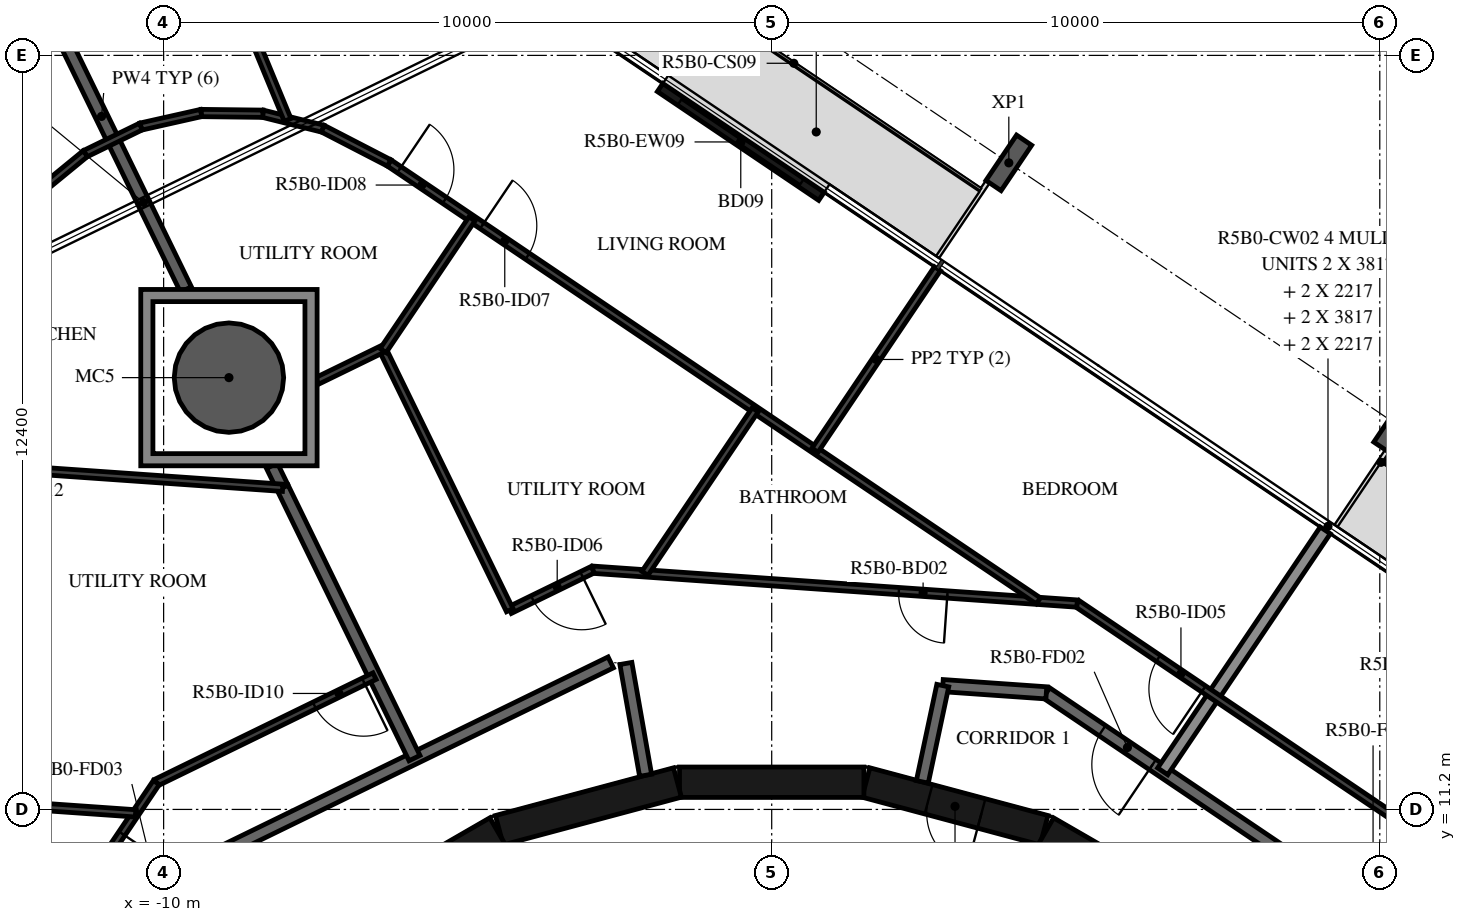
"""IFC4 building model, lengths in metres.
Left out: names, types, materials, properties, quantities, classifications, styles, units other than length and angle.
Written with IfcOpenShell. Run it as: python <this file> out.ifc"""

import sys

from ifc_helpers import new_model, si_unit, direction, frame, frame_2d, origin, origin_2d, place, context, subcontext, project, spatial, polyline, rectangle, hollow_circle, i_section, outline, extrude, element, fill, save


model = new_model("IFC4")
c1 = context("Model", 3, precision=1e-05, world=origin(), true_north=direction((0.0, 1.0)))
c2 = subcontext(c1, "Body", "Model", "MODEL_VIEW")
j1 = project(units=[si_unit("LENGTHUNIT", "METRE"), si_unit("PLANEANGLEUNIT", "RADIAN")], contexts=[c1])
p1 = place(None, origin())
s1 = spatial("IfcSite", under=j1, at=p1, CompositionType="ELEMENT")
p2 = place(p1, origin())
s2 = spatial("IfcBuilding", under=s1, at=p2, CompositionType="ELEMENT")
p3 = place(p2, frame((0.0, 0.0, 202.4)))
s3 = spatial("IfcBuildingStorey", under=s2, at=p3, CompositionType="ELEMENT", Elevation=202.4)
p4 = place(p3, frame((-8.926, 18.301, -0.38), z_axis=(0.0, 0.0, 1.0), x_axis=(1.0, 0.0, 0.0)))
e1 = element("IfcColumn", 1, at=p4, inside=s3, PredefinedType="COLUMN", context=c2, shape_type="SweptSolid", body=[
    extrude(hollow_circle(Radius=0.9, WallThickness=0.04, at=origin_2d()), origin(), (0.0, 0.0, 1.0), 3.5),
])
for number, where, z_axis, x_axis in (
    (2, (10.278, 17.531, -0.38), (0.0, 0.0, 1.0), (0.829, -0.559, 0.0)),
    (3, (3.899, 21.833, -0.38), (0.0, 0.0, 1.0), (0.829, -0.559, 0.0)),
):
    element("IfcColumn", number, at=place(p3, frame(where, z_axis=z_axis, x_axis=x_axis)), inside=s3, PredefinedType="COLUMN", context=c2, shape_type="SweptSolid", body=[
        extrude(i_section(OverallWidth=0.3, OverallDepth=0.9, WebThickness=0.019, FlangeThickness=0.035, FilletRadius=0.03, at=origin_2d()), origin(), (0.0, 0.0, 1.0), 3.5),
    ])
p5 = place(p3, frame((0.818, 21.282, 0.0), z_axis=(0.0, 0.0, 1.0), x_axis=(-0.829044984211, 0.559181915082, 0.0)))
e4 = element("IfcWall", 4, at=p5, inside=s3, PredefinedType="STANDARD", context=c2, shape_type="SweptSolid", body=[
    extrude(rectangle(XDim=3.2, YDim=0.16, at=frame_2d((1.6, 0.0))), origin(), (0.0, 0.0, 1.0), 3.12),
])
p6 = place(p5, frame((0.4, 0.0, 0.0)))
e5 = element("IfcOpeningElement", 5, at=p6, cuts=e4, PredefinedType="OPENING", context=c2, shape_type="SweptSolid", body=[
    extrude(rectangle(XDim=2.4, YDim=2.4, at=frame_2d((1.2, 1.2))), frame((0.0, 0.09, 0.0), z_axis=(0.0, -1.0, 0.0), x_axis=(1.0, 0.0, 0.0)), (0.0, 0.0, 1.0), 0.18),
])
p7 = place(p3, frame((7.137, 9.329, 0.0), z_axis=(0.0, 0.0, 1.0), x_axis=(-0.865975092491, 0.500087131594, 0.0)))
e6 = element("IfcWall", 6, at=p7, inside=s3, PredefinedType="SHEAR", context=c2, shape_type="SweptSolid", body=[
    extrude(rectangle(XDim=3.033, YDim=0.5, at=frame_2d((1.516, 0.0))), origin(), (0.0, 0.0, 1.0), 3.12),
])
p8 = place(p3, frame((4.479, 10.858, 0.0), z_axis=(0.0, 0.0, 1.0), x_axis=(-0.965948410781, 0.258734743916, 0.0)))
e7 = element("IfcWall", 7, at=p8, inside=s3, PredefinedType="SHEAR", context=c2, shape_type="SweptSolid", body=[
    extrude(rectangle(XDim=3.033, YDim=0.5, at=frame_2d((1.516, 0.0))), origin(), (0.0, 0.0, 1.0), 3.12),
])
p9 = place(p8, frame((1.066, 0.0, 0.0)))
e8 = element("IfcOpeningElement", 8, at=p9, cuts=e7, PredefinedType="OPENING", context=c2, shape_type="SweptSolid", body=[
    extrude(rectangle(XDim=0.9, YDim=2.1, at=frame_2d((0.45, 1.05))), frame((0.0, 0.26, 0.0), z_axis=(0.0, -1.0, 0.0), x_axis=(1.0, 0.0, 0.0)), (0.0, 0.0, 1.0), 0.52),
])
for number, where, z_axis, x_axis in (
    (9, (1.516, 11.647, 0.0), (0.0, 0.0, 1.0), (-1.0, 0.0, 0.0)),
    (10, (-1.55, 11.643, 0.0), (0.0, 0.0, 1.0), (-0.966, -0.259, 0.0)),
    (11, (-4.51, 10.845, 0.0), (0.0, 0.0, 1.0), (-0.866, -0.5, 0.0)),
):
    element("IfcWall", number, at=place(p3, frame(where, z_axis=z_axis, x_axis=x_axis)), inside=s3, PredefinedType="SHEAR", context=c2, shape_type="SweptSolid", body=[
        extrude(rectangle(XDim=3.033, YDim=0.5, at=frame_2d((1.516, 0.0))), origin(), (0.0, 0.0, 1.0), 3.12),
    ])
p10 = place(p3, frame((10.47, 9.101, 0.0), z_axis=(0.0, 0.0, 1.0), x_axis=(-0.829035841718, 0.559195469534, 0.0)))
e12 = element("IfcWall", 12, at=p10, inside=s3, PredefinedType="STANDARD", context=c2, shape_type="SweptSolid", body=[
    extrude(rectangle(XDim=7.181, YDim=0.2, at=frame_2d((3.591, 0.0))), origin(), (0.0, 0.0, 1.0), 3.12),
])
p11 = place(p10, frame((0.2, 0.0, 0.0)))
e13 = element("IfcOpeningElement", 13, at=p11, cuts=e12, PredefinedType="OPENING", context=c2, shape_type="SweptSolid", body=[
    extrude(rectangle(XDim=1.0, YDim=2.1, at=frame_2d((0.5, 1.05))), frame((0.0, 0.11, 0.0), z_axis=(0.0, -1.0, 0.0), x_axis=(1.0, 0.0, 0.0)), (0.0, 0.0, 1.0), 0.22),
])
p12 = place(p10, frame((5.073, 0.0, 0.0)))
e14 = element("IfcOpeningElement", 14, at=p12, cuts=e12, PredefinedType="OPENING", context=c2, shape_type="SweptSolid", body=[
    extrude(rectangle(XDim=1.0, YDim=2.1, at=frame_2d((0.5, 1.05))), frame((0.0, 0.11, 0.0), z_axis=(0.0, -1.0, 0.0), x_axis=(1.0, 0.0, 0.0)), (0.0, 0.0, 1.0), 0.22),
])
p13 = place(p3, frame((4.517, 13.117, 0.0), z_axis=(0.0, 0.0, 1.0), x_axis=(-0.997562153664, 0.069783591025, 0.0)))
e15 = element("IfcWall", 15, at=p13, inside=s3, PredefinedType="STANDARD", context=c2, shape_type="SweptSolid", body=[
    extrude(rectangle(XDim=1.707, YDim=0.2, at=frame_2d((0.854, 0.0))), origin(), (0.0, 0.0, 1.0), 3.12),
])
p14 = place(p3, frame((2.813, 13.236, 0.0), z_axis=(0.0, 0.0, 1.0), x_axis=(-0.207911086063, -0.978147729278, 0.0)))
e16 = element("IfcWall", 16, at=p14, inside=s3, PredefinedType="STANDARD", context=c2, shape_type="SweptSolid", body=[
    extrude(rectangle(XDim=1.618, YDim=0.2, at=frame_2d((0.809, 0.0))), origin(), (0.0, 0.0, 1.0), 3.12),
])
p15 = place(p3, frame((-2.074, 11.761, 0.0), z_axis=(0.0, 0.0, 1.0), x_axis=(-0.173740587112, 0.984791454263, 0.0)))
e17 = element("IfcWall", 17, at=p15, inside=s3, PredefinedType="STANDARD", context=c2, shape_type="SweptSolid", body=[
    extrude(rectangle(XDim=1.867, YDim=0.2, at=frame_2d((0.934, 0.0))), origin(), (0.0, 0.0, 1.0), 3.12),
])
p16 = place(p3, frame((-2.647, 13.618, 0.0), z_axis=(0.0, 0.0, 1.0), x_axis=(-0.898796543751, -0.438366026218, 0.0)))
e18 = element("IfcWall", 18, at=p16, inside=s3, PredefinedType="STANDARD", context=c2, shape_type="SweptSolid", body=[
    extrude(rectangle(XDim=7.181, YDim=0.2, at=frame_2d((3.591, 0.0))), origin(), (0.0, 0.0, 1.0), 3.12),
])
p17 = place(p3, frame((9.104, 15.79, 0.0), z_axis=(0.0, 0.0, 1.0), x_axis=(-0.559193912135, -0.829036892201, 0.0)))
e19 = element("IfcWall", 19, at=p17, inside=s3, PredefinedType="STANDARD", context=c2, shape_type="SweptSolid", body=[
    extrude(rectangle(XDim=4.781, YDim=0.2, at=frame_2d((2.39, 0.0))), origin(), (0.0, 0.0, 1.0), 2.73),
])
p18 = place(p3, frame((-8.042, 16.489, 0.0), z_axis=(0.0, 0.0, 1.0), x_axis=(0.438345825707, -0.898806395774, 0.0)))
e20 = element("IfcWall", 20, at=p18, inside=s3, PredefinedType="STANDARD", context=c2, shape_type="SweptSolid", body=[
    extrude(rectangle(XDim=4.946, YDim=0.2, at=frame_2d((2.473, 0.0))), origin(), (0.0, 0.0, 1.0), 3.12),
])
p19 = place(p3, frame((-8.219, 16.851, 0.0), z_axis=(0.0, 0.0, 1.0), x_axis=(0.438281645094, -0.898837693676, 0.0)))
e21 = element("IfcWall", 21, at=p19, inside=s3, PredefinedType="STANDARD", context=c2, shape_type="SweptSolid", body=[
    extrude(rectangle(XDim=0.373, YDim=0.2, at=frame_2d((0.186, 0.0))), origin(), (0.0, 0.0, 1.0), 3.12),
])
p20 = place(p3, frame((-12.409, 25.442, 0.0), z_axis=(0.0, 0.0, 1.0), x_axis=(0.43838641251, -0.898786600549, 0.0)))
e22 = element("IfcWall", 22, at=p20, inside=s3, PredefinedType="STANDARD", context=c2, shape_type="SweptSolid", body=[
    extrude(rectangle(XDim=6.333, YDim=0.2, at=frame_2d((3.166, 0.0))), origin(), (0.0, 0.0, 1.0), 3.12),
])
p21 = place(p3, frame((11.642, 10.12, 0.0), z_axis=(0.0, 0.0, 1.0), x_axis=(-0.829032241779, 0.55920080659, 0.0)))
e23 = element("IfcWall", 23, at=p21, inside=s3, PredefinedType="PARTITIONING", context=c2, shape_type="SweptSolid", body=[
    extrude(rectangle(XDim=7.985, YDim=0.12, at=frame_2d((3.992, 0.0))), origin(), (0.0, 0.0, 1.0), 3.12),
])
p22 = place(p21, frame((0.2, 0.0, 0.0)))
e24 = element("IfcOpeningElement", 24, at=p22, cuts=e23, PredefinedType="OPENING", context=c2, shape_type="SweptSolid", body=[
    extrude(rectangle(XDim=0.9, YDim=2.1, at=frame_2d((0.45, 1.05))), frame((0.0, 0.07, 0.0), z_axis=(0.0, -1.0, 0.0), x_axis=(1.0, 0.0, 0.0)), (0.0, 0.0, 1.0), 0.14),
])
p23 = place(p21, frame((5.475, 0.0, 0.0)))
e25 = element("IfcOpeningElement", 25, at=p23, cuts=e23, PredefinedType="OPENING", context=c2, shape_type="SweptSolid", body=[
    extrude(rectangle(XDim=0.9, YDim=2.1, at=frame_2d((0.45, 1.05))), frame((0.0, 0.07, 0.0), z_axis=(0.0, -1.0, 0.0), x_axis=(1.0, 0.0, 0.0)), (0.0, 0.0, 1.0), 0.14),
])
p24 = place(p3, frame((5.022, 14.585, 0.0), z_axis=(0.0, 0.0, 1.0), x_axis=(-0.997565118395, 0.069741197017, 0.0)))
e26 = element("IfcWall", 26, at=p24, inside=s3, PredefinedType="PARTITIONING", context=c2, shape_type="SweptSolid", body=[
    extrude(rectangle(XDim=7.985, YDim=0.12, at=frame_2d((3.993, 0.0))), origin(), (0.0, 0.0, 1.0), 3.12),
])
p25 = place(p24, frame((2.138, 0.0, 0.0)))
e27 = element("IfcOpeningElement", 27, at=p25, cuts=e26, PredefinedType="OPENING", context=c2, shape_type="SweptSolid", body=[
    extrude(rectangle(XDim=0.8, YDim=2.1, at=frame_2d((0.4, 1.05))), frame((0.0, 0.07, 0.0), z_axis=(0.0, -1.0, 0.0), x_axis=(1.0, 0.0, 0.0)), (0.0, 0.0, 1.0), 0.14),
])
p26 = place(p3, frame((-2.943, 15.142, 0.0), z_axis=(0.0, 0.0, 1.0), x_axis=(-0.898853439798, -0.438249351127, 0.0)))
e28 = element("IfcWall", 28, at=p26, inside=s3, PredefinedType="PARTITIONING", context=c2, shape_type="SweptSolid", body=[
    extrude(rectangle(XDim=1.518, YDim=0.12, at=frame_2d((0.759, 0.0))), origin(), (0.0, 0.0, 1.0), 3.12),
])
p27 = place(p26, frame((0.2, 0.0, 0.0)))
e29 = element("IfcOpeningElement", 29, at=p27, cuts=e28, PredefinedType="OPENING", context=c2, shape_type="SweptSolid", body=[
    extrude(rectangle(XDim=0.9, YDim=2.1, at=frame_2d((0.45, 1.05))), frame((0.0, 0.07, 0.0), z_axis=(0.0, -1.0, 0.0), x_axis=(1.0, 0.0, 0.0)), (0.0, 0.0, 1.0), 0.14),
])
p28 = place(p3, frame((-4.308, 14.477, 0.0), z_axis=(0.0, 0.0, 1.0), x_axis=(-0.43837096777, 0.898794133613, 0.0)))
e30 = element("IfcWall", 30, at=p28, inside=s3, PredefinedType="PARTITIONING", context=c2, shape_type="SweptSolid", body=[
    extrude(rectangle(XDim=4.75, YDim=0.12, at=frame_2d((2.375, 0.0))), origin(), (0.0, 0.0, 1.0), 3.12),
])
p29 = place(p3, frame((-6.402, 18.771, 0.0), z_axis=(0.0, 0.0, 1.0), x_axis=(-0.898797905192, -0.438363234797, 0.0)))
e31 = element("IfcWall", 31, at=p29, inside=s3, PredefinedType="PARTITIONING", context=c2, shape_type="SweptSolid", body=[
    extrude(rectangle(XDim=1.195, YDim=0.12, at=frame_2d((0.597, 0.0))), origin(), (0.0, 0.0, 1.0), 3.12),
])
p30 = place(p3, frame((-6.292, 21.831, 0.0), z_axis=(0.0, 0.0, 1.0), x_axis=(0.829040041754, -0.559189242715, 0.0)))
e32 = element("IfcWall", 32, at=p30, inside=s3, PredefinedType="PARTITIONING", context=c2, shape_type="SweptSolid", body=[
    extrude(rectangle(XDim=12.879, YDim=0.12, at=frame_2d((6.439, 0.0))), origin(), (0.0, 0.0, 1.0), 3.12),
])
p31 = place(p30, frame((1.844, 0.0, 0.0)))
e33 = element("IfcOpeningElement", 33, at=p31, cuts=e32, PredefinedType="OPENING", context=c2, shape_type="SweptSolid", body=[
    extrude(rectangle(XDim=0.9, YDim=2.1, at=frame_2d((0.45, 1.05))), frame((0.0, 0.07, 0.0), z_axis=(0.0, -1.0, 0.0), x_axis=(1.0, 0.0, 0.0)), (0.0, 0.0, 1.0), 0.14),
])
p32 = place(p30, frame((0.2, 0.0, 0.0)))
e34 = element("IfcOpeningElement", 34, at=p32, cuts=e32, PredefinedType="OPENING", context=c2, shape_type="SweptSolid", body=[
    extrude(rectangle(XDim=0.9, YDim=2.1, at=frame_2d((0.45, 1.05))), frame((0.0, 0.07, 0.0), z_axis=(0.0, -1.0, 0.0), x_axis=(1.0, 0.0, 0.0)), (0.0, 0.0, 1.0), 0.14),
])
p33 = place(p3, frame((2.725, 20.092, 0.0), z_axis=(0.0, 0.0, 1.0), x_axis=(-0.559230560117, -0.829012171582, 0.0)))
e35 = element("IfcWall", 35, at=p33, inside=s3, PredefinedType="PARTITIONING", context=c2, shape_type="SweptSolid", body=[
    extrude(rectangle(XDim=3.6, YDim=0.12, at=frame_2d((1.8, 0.0))), origin(), (0.0, 0.0, 1.0), 2.73),
])
p34 = place(p3, frame((-0.272, 17.771, 0.0), z_axis=(0.0, 0.0, 1.0), x_axis=(-0.559174158254, -0.829050216055, 0.0)))
e36 = element("IfcWall", 36, at=p34, inside=s3, PredefinedType="PARTITIONING", context=c2, shape_type="SweptSolid", body=[
    extrude(rectangle(XDim=3.243, YDim=0.12, at=frame_2d((1.622, 0.0))), origin(), (0.0, 0.0, 1.0), 3.12),
])
p35 = place(p3, frame((-8.367, 22.64, 0.0), z_axis=(0.0, 0.0, 1.0), x_axis=(0.970340073087, -0.241743960754, 0.0)))
e37 = element("IfcWall", 37, at=p35, inside=s3, PredefinedType="PARTITIONING", context=c2, shape_type="SweptSolid", body=[
    extrude(rectangle(XDim=1.016, YDim=0.12, at=frame_2d((0.508, 0.0))), origin(), (0.0, 0.0, 1.0), 3.12),
])
p36 = place(p3, frame((-7.382, 22.395, 0.0), z_axis=(0.0, 0.0, 1.0), x_axis=(0.888296031948, -0.459271335514, 0.0)))
e38 = element("IfcWall", 38, at=p36, inside=s3, PredefinedType="PARTITIONING", context=c2, shape_type="SweptSolid", body=[
    extrude(rectangle(XDim=1.227, YDim=0.12, at=frame_2d((0.613, 0.0))), origin(), (0.0, 0.0, 1.0), 3.12),
])
p37 = place(p3, frame((-9.498, 26.254, 0.0), z_axis=(0.0, 0.0, 1.0), x_axis=(0.38230709116, -0.924035328355, 0.0)))
e39 = element("IfcWall", 39, at=p37, inside=s3, PredefinedType="PARTITIONING", context=c2, shape_type="SweptSolid", body=[
    extrude(rectangle(XDim=4.02, YDim=0.12, at=frame_2d((2.01, 0.0))), origin(), (0.0, 0.0, 1.0), 3.12),
])
p38 = place(p37, frame((0.3, 0.0, 0.0)))
e40 = element("IfcOpeningElement", 40, at=p38, cuts=e39, PredefinedType="OPENING", context=c2, shape_type="SweptSolid", body=[
    extrude(rectangle(XDim=0.9, YDim=2.1, at=frame_2d((0.45, 1.05))), frame((0.0, 0.07, 0.0), z_axis=(0.0, -1.0, 0.0), x_axis=(1.0, 0.0, 0.0)), (0.0, 0.0, 1.0), 0.14),
])
p39 = place(p3, frame((-4.929, 20.912, 0.0), z_axis=(0.0, 0.0, 1.0), x_axis=(-0.559155109057, -0.829063063955, 0.0)))
e41 = element("IfcWall", 41, at=p39, inside=s3, PredefinedType="PARTITIONING", context=c2, shape_type="SweptSolid", body=[
    extrude(rectangle(XDim=2.613, YDim=0.12, at=frame_2d((1.307, 0.0))), origin(), (0.0, 0.0, 1.0), 3.12),
])
for number, where, z_axis, x_axis in (
    (42, (-8.367, 22.64, 0.0), (0.0, 0.0, 1.0), (-1.0, 0.012, 0.0)),
    (43, (-9.383, 22.652, 0.0), (0.0, 0.0, 1.0), (-0.976, -0.219, 0.0)),
):
    element("IfcWall", number, at=place(p3, frame(where, z_axis=z_axis, x_axis=x_axis)), inside=s3, PredefinedType="PARTITIONING", context=c2, shape_type="SweptSolid", body=[
        extrude(rectangle(XDim=1.016, YDim=0.12, at=frame_2d((0.508, 0.0))), origin(), (0.0, 0.0, 1.0), 3.12),
    ])
p40 = place(p3, frame((-10.375, 22.43, 0.0), z_axis=(0.0, 0.0, 1.0), x_axis=(-0.898710701911, -0.438541986895, 0.0)))
e44 = element("IfcWall", 44, at=p40, inside=s3, PredefinedType="PARTITIONING", context=c2, shape_type="SweptSolid", body=[
    extrude(rectangle(XDim=1.016, YDim=0.12, at=frame_2d((0.508, 0.0))), origin(), (0.0, 0.0, 1.0), 3.12),
])
p41 = place(p3, frame((-6.532, 13.392, 0.0), z_axis=(0.0, 0.0, 1.0), x_axis=(-0.898786663593, -0.438386283256, 0.0)))
e45 = element("IfcWall", 45, at=p41, inside=s3, PredefinedType="PARTITIONING", context=c2, shape_type="SweptSolid", body=[
    extrude(rectangle(XDim=3.992, YDim=0.12, at=frame_2d((1.996, 0.0))), origin(), (0.0, 0.0, 1.0), 3.12),
])
p42 = place(p41, frame((0.2, 0.0, 0.0)))
e46 = element("IfcOpeningElement", 46, at=p42, cuts=e45, PredefinedType="OPENING", context=c2, shape_type="SweptSolid", body=[
    extrude(rectangle(XDim=0.9, YDim=2.1, at=frame_2d((0.45, 1.05))), frame((0.0, 0.07, 0.0), z_axis=(0.0, -1.0, 0.0), x_axis=(1.0, 0.0, 0.0)), (0.0, 0.0, 1.0), 0.14),
])
p43 = place(p3, frame((-10.12, 11.642, 0.0), z_axis=(0.0, 0.0, 1.0), x_axis=(-0.559200431187, -0.829032494996, 0.0)))
e47 = element("IfcWall", 47, at=p43, inside=s3, PredefinedType="PARTITIONING", context=c2, shape_type="SweptSolid", body=[
    extrude(rectangle(XDim=6.973, YDim=0.12, at=frame_2d((3.487, 0.0))), origin(), (0.0, 0.0, 1.0), 3.12),
])
p44 = place(p43, frame((1.011, 0.0, 0.0)))
e48 = element("IfcOpeningElement", 48, at=p44, cuts=e47, PredefinedType="OPENING", context=c2, shape_type="SweptSolid", body=[
    extrude(rectangle(XDim=0.8, YDim=2.1, at=frame_2d((0.4, 1.05))), frame((0.0, 0.07, 0.0), z_axis=(0.0, -1.0, 0.0), x_axis=(1.0, 0.0, 0.0)), (0.0, 0.0, 1.0), 0.14),
])
p45 = place(p3, frame((-11.288, 21.984, 0.0), z_axis=(0.0, 0.0, 1.0), x_axis=(-0.773571701215, -0.633708784127, 0.0)))
e49 = element("IfcWall", 49, at=p45, inside=s3, PredefinedType="PARTITIONING", context=c2, shape_type="SweptSolid", body=[
    extrude(rectangle(XDim=1.016, YDim=0.12, at=frame_2d((0.508, 0.0))), origin(), (0.0, 0.0, 1.0), 3.12),
])
p46 = place(p3, frame((-13.437, 16.866, 0.0), z_axis=(0.0, 0.0, 1.0), x_axis=(0.997564592961, -0.06974871232, 0.0)))
e50 = element("IfcWall", 50, at=p46, inside=s3, PredefinedType="PARTITIONING", context=c2, shape_type="SweptSolid", body=[
    extrude(rectangle(XDim=5.408, YDim=0.12, at=frame_2d((2.704, 0.0))), origin(), (0.0, 0.0, 1.0), 3.12),
])
p47 = place(p46, frame((0.2, 0.0, 0.0)))
e51 = element("IfcOpeningElement", 51, at=p47, cuts=e50, PredefinedType="OPENING", context=c2, shape_type="SweptSolid", body=[
    extrude(rectangle(XDim=0.9, YDim=2.1, at=frame_2d((0.45, 1.05))), frame((0.0, 0.07, 0.0), z_axis=(0.0, -1.0, 0.0), x_axis=(1.0, 0.0, 0.0)), (0.0, 0.0, 1.0), 0.14),
])
p48 = place(p3, frame((-13.821, 11.37, 0.0), z_axis=(0.0, 0.0, 1.0), x_axis=(0.997559977048, -0.069814698975, 0.0)))
e52 = element("IfcWall", 52, at=p48, inside=s3, PredefinedType="PARTITIONING", context=c2, shape_type="SweptSolid", body=[
    extrude(rectangle(XDim=3.368, YDim=0.12, at=frame_2d((1.684, 0.0))), origin(), (0.0, 0.0, 1.0), 3.12),
])
p49 = place(p3, origin())
e53 = element("IfcWall", 53, at=p49, inside=s3, PredefinedType="STANDARD", context=c2, shape_type="SweptSolid", body=[
    extrude(outline(polyline([(-7.476, 19.751), (-7.476, 16.851), (-10.376, 16.851), (-10.376, 19.751), (-7.476, 19.751)]), holes=[polyline([(-10.176, 17.051), (-7.676, 17.051), (-7.676, 19.551), (-10.176, 19.551), (-10.176, 17.051)])]), origin(), (0.0, 0.0, 1.0), 3.12),
])
p50 = place(p6, origin())
e54 = element("IfcDoor", 54, at=p50, inside=s3, OperationType="DOUBLE_DOOR_SLIDING", PredefinedType="DOOR", context=c2, shape_type="SweptSolid", body=[
    extrude(rectangle(XDim=2.4, YDim=2.4, at=frame_2d((1.2, 1.2))), frame((0.0, 0.025, 0.0), z_axis=(0.0, -1.0, 0.0), x_axis=(1.0, 0.0, 0.0)), (0.0, 0.0, 1.0), 0.05),
])
fill(e5, e54)
p51 = place(p9, origin())
e55 = element("IfcDoor", 55, at=p51, inside=s3, OperationType="SINGLE_SWING_LEFT", PredefinedType="DOOR", context=c2, shape_type="SweptSolid", body=[
    extrude(rectangle(XDim=0.9, YDim=2.1, at=frame_2d((0.45, 1.05))), frame((0.0, 0.025, 0.0), z_axis=(0.0, -1.0, 0.0), x_axis=(1.0, 0.0, 0.0)), (0.0, 0.0, 1.0), 0.05),
])
fill(e8, e55)
p52 = place(p12, origin())
e56 = element("IfcDoor", 56, at=p52, inside=s3, OperationType="SINGLE_SWING_RIGHT", PredefinedType="DOOR", context=c2, shape_type="SweptSolid", body=[
    extrude(rectangle(XDim=1.0, YDim=2.1, at=frame_2d((0.5, 1.05))), frame((0.0, 0.025, 0.0), z_axis=(0.0, -1.0, 0.0), x_axis=(1.0, 0.0, 0.0)), (0.0, 0.0, 1.0), 0.05),
])
fill(e14, e56)
p53 = place(p23, origin())
e57 = element("IfcDoor", 57, at=p53, inside=s3, OperationType="SINGLE_SWING_RIGHT", PredefinedType="DOOR", context=c2, shape_type="SweptSolid", body=[
    extrude(rectangle(XDim=0.9, YDim=2.1, at=frame_2d((0.45, 1.05))), frame((0.0, 0.025, 0.0), z_axis=(0.0, -1.0, 0.0), x_axis=(1.0, 0.0, 0.0)), (0.0, 0.0, 1.0), 0.05),
])
fill(e25, e57)
p54 = place(p25, origin())
e58 = element("IfcDoor", 58, at=p54, inside=s3, OperationType="SINGLE_SWING_RIGHT", PredefinedType="DOOR", context=c2, shape_type="SweptSolid", body=[
    extrude(rectangle(XDim=0.8, YDim=2.1, at=frame_2d((0.4, 1.05))), frame((0.0, 0.025, 0.0), z_axis=(0.0, -1.0, 0.0), x_axis=(1.0, 0.0, 0.0)), (0.0, 0.0, 1.0), 0.05),
])
fill(e27, e58)
p55 = place(p27, origin())
e59 = element("IfcDoor", 59, at=p55, inside=s3, OperationType="SINGLE_SWING_RIGHT", PredefinedType="DOOR", context=c2, shape_type="SweptSolid", body=[
    extrude(rectangle(XDim=0.9, YDim=2.1, at=frame_2d((0.45, 1.05))), frame((0.0, 0.025, 0.0), z_axis=(0.0, -1.0, 0.0), x_axis=(1.0, 0.0, 0.0)), (0.0, 0.0, 1.0), 0.05),
])
fill(e29, e59)
p56 = place(p31, origin())
e60 = element("IfcDoor", 60, at=p56, inside=s3, OperationType="SINGLE_SWING_RIGHT", PredefinedType="DOOR", context=c2, shape_type="SweptSolid", body=[
    extrude(rectangle(XDim=0.9, YDim=2.1, at=frame_2d((0.45, 1.05))), frame((0.0, 0.025, 0.0), z_axis=(0.0, -1.0, 0.0), x_axis=(1.0, 0.0, 0.0)), (0.0, 0.0, 1.0), 0.05),
])
fill(e33, e60)
p57 = place(p32, origin())
e61 = element("IfcDoor", 61, at=p57, inside=s3, OperationType="SINGLE_SWING_LEFT", PredefinedType="DOOR", context=c2, shape_type="SweptSolid", body=[
    extrude(rectangle(XDim=0.9, YDim=2.1, at=frame_2d((0.45, 1.05))), frame((0.0, 0.025, 0.0), z_axis=(0.0, -1.0, 0.0), x_axis=(1.0, 0.0, 0.0)), (0.0, 0.0, 1.0), 0.05),
])
fill(e34, e61)
p58 = place(p42, origin())
e62 = element("IfcDoor", 62, at=p58, inside=s3, OperationType="SINGLE_SWING_LEFT", PredefinedType="DOOR", context=c2, shape_type="SweptSolid", body=[
    extrude(rectangle(XDim=0.9, YDim=2.1, at=frame_2d((0.45, 1.05))), frame((0.0, 0.025, 0.0), z_axis=(0.0, -1.0, 0.0), x_axis=(1.0, 0.0, 0.0)), (0.0, 0.0, 1.0), 0.05),
])
fill(e46, e62)
p59 = place(p44, origin())
e63 = element("IfcDoor", 63, at=p59, inside=s3, OperationType="SINGLE_SWING_LEFT", PredefinedType="DOOR", context=c2, shape_type="SweptSolid", body=[
    extrude(rectangle(XDim=0.8, YDim=2.1, at=frame_2d((0.4, 1.05))), frame((0.0, 0.025, 0.0), z_axis=(0.0, -1.0, 0.0), x_axis=(1.0, 0.0, 0.0)), (0.0, 0.0, 1.0), 0.05),
])
fill(e48, e63)
save(model, sys.argv[1])
